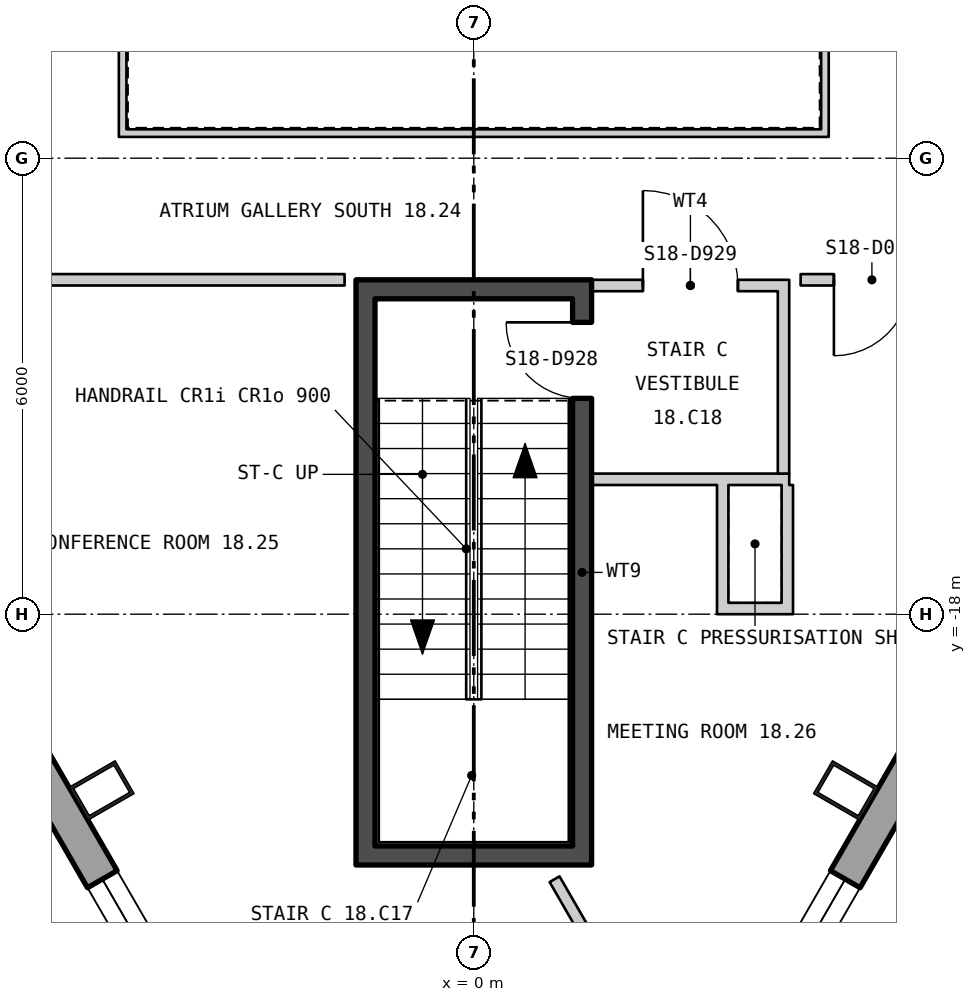
"""IFC4 building model, lengths in metres.
Left out: names, types, materials, properties, quantities, classifications, styles, units other than length and angle.
Written with IfcOpenShell. Run it as: python <this file> out.ifc"""

import sys

from ifc_helpers import new_model, si_unit, direction, frame, frame_2d, origin, origin_2d, place, context, subcontext, project, spatial, polyline, rectangle, hollow_rectangle, outline, extrude, element, fill, save


model = new_model("IFC4")
c1 = context("Model", 3, precision=1e-05, world=origin(), true_north=direction((0.0, 1.0)))
c2 = subcontext(c1, "Body", "Model", "MODEL_VIEW")
j1 = project(units=[si_unit("LENGTHUNIT", "METRE"), si_unit("PLANEANGLEUNIT", "RADIAN")], contexts=[c1])
p1 = place(None, origin())
s1 = spatial("IfcSite", under=j1, at=p1, CompositionType="ELEMENT")
p2 = place(p1, origin())
s2 = spatial("IfcBuilding", under=s1, at=p2, CompositionType="ELEMENT")
p3 = place(p2, frame((0.0, 0.0, 245.4)))
s3 = spatial("IfcBuildingStorey", under=s2, at=p3, CompositionType="ELEMENT", Elevation=245.4)
for number, where, z_axis, x_axis in (
    (1, (-4.897, -20.319, 0.0), (0.0, 0.0, 1.0), (0.5, -0.866, 0.0)),
    (2, (4.897, -20.319, 0.0), (0.0, 0.0, 1.0), (0.5, 0.866, 0.0)),
):
    element("IfcColumn", number, at=place(p3, frame(where, z_axis=z_axis, x_axis=x_axis)), inside=s3, PredefinedType="COLUMN", context=c2, shape_type="SweptSolid", body=[
        extrude(hollow_rectangle(XDim=0.5, YDim=0.7, WallThickness=0.045, at=origin_2d()), origin(), (0.0, 0.0, 1.0), 3.9),
    ])
p4 = place(p3, frame((-25.85, 14.822, -0.18), z_axis=(0.0, 0.0, 1.0), x_axis=(0.500000335318, -0.866025210188, 0.0)))
e3 = element("IfcWall", 3, at=p4, inside=s3, PredefinedType="SOLIDWALL", context=c2, shape_type="SweptSolid", body=[
    extrude(outline(polyline([(-0.13, -0.225), (45.88, -0.225), (45.62, 0.225), (0.13, 0.225), (-0.13, -0.225)])), origin(), (0.0, 0.0, 1.0), 3.68),
])
p5 = place(p4, frame((1.425, 0.0, 1.08)))
e4 = element("IfcOpeningElement", 4, at=p5, cuts=e3, PredefinedType="OPENING", context=c2, shape_type="SweptSolid", body=[
    extrude(rectangle(XDim=2.4, YDim=2.0, at=frame_2d((1.2, 1.0))), frame((0.0, 0.235, 0.0), z_axis=(0.0, -1.0, 0.0), x_axis=(1.0, 0.0, 0.0)), (0.0, 0.0, 1.0), 0.47),
])
p6 = place(p4, frame((10.403, 0.0, 1.08)))
e5 = element("IfcOpeningElement", 5, at=p6, cuts=e3, PredefinedType="OPENING", context=c2, shape_type="SweptSolid", body=[
    extrude(rectangle(XDim=2.4, YDim=2.0, at=frame_2d((1.2, 1.0))), frame((0.0, 0.235, 0.0), z_axis=(0.0, -1.0, 0.0), x_axis=(1.0, 0.0, 0.0)), (0.0, 0.0, 1.0), 0.47),
])
p7 = place(p4, frame((14.912, 0.0, 1.08)))
e6 = element("IfcOpeningElement", 6, at=p7, cuts=e3, PredefinedType="OPENING", context=c2, shape_type="SweptSolid", body=[
    extrude(rectangle(XDim=2.4, YDim=2.0, at=frame_2d((1.2, 1.0))), frame((0.0, 0.235, 0.0), z_axis=(0.0, -1.0, 0.0), x_axis=(1.0, 0.0, 0.0)), (0.0, 0.0, 1.0), 0.47),
])
p8 = place(p4, frame((19.421, 0.0, 1.08)))
e7 = element("IfcOpeningElement", 7, at=p8, cuts=e3, PredefinedType="OPENING", context=c2, shape_type="SweptSolid", body=[
    extrude(rectangle(XDim=2.4, YDim=2.0, at=frame_2d((1.2, 1.0))), frame((0.0, 0.235, 0.0), z_axis=(0.0, -1.0, 0.0), x_axis=(1.0, 0.0, 0.0)), (0.0, 0.0, 1.0), 0.47),
])
p9 = place(p4, frame((23.929, 0.0, 1.08)))
e8 = element("IfcOpeningElement", 8, at=p9, cuts=e3, PredefinedType="OPENING", context=c2, shape_type="SweptSolid", body=[
    extrude(rectangle(XDim=2.4, YDim=2.0, at=frame_2d((1.2, 1.0))), frame((0.0, 0.235, 0.0), z_axis=(0.0, -1.0, 0.0), x_axis=(1.0, 0.0, 0.0)), (0.0, 0.0, 1.0), 0.47),
])
p10 = place(p4, frame((28.438, 0.0, 1.08)))
e9 = element("IfcOpeningElement", 9, at=p10, cuts=e3, PredefinedType="OPENING", context=c2, shape_type="SweptSolid", body=[
    extrude(rectangle(XDim=2.4, YDim=2.0, at=frame_2d((1.2, 1.0))), frame((0.0, 0.235, 0.0), z_axis=(0.0, -1.0, 0.0), x_axis=(1.0, 0.0, 0.0)), (0.0, 0.0, 1.0), 0.47),
])
p11 = place(p4, frame((32.947, 0.0, 1.08)))
e10 = element("IfcOpeningElement", 10, at=p11, cuts=e3, PredefinedType="OPENING", context=c2, shape_type="SweptSolid", body=[
    extrude(rectangle(XDim=2.4, YDim=2.0, at=frame_2d((1.2, 1.0))), frame((0.0, 0.235, 0.0), z_axis=(0.0, -1.0, 0.0), x_axis=(1.0, 0.0, 0.0)), (0.0, 0.0, 1.0), 0.47),
])
p12 = place(p4, frame((37.455, 0.0, 1.08)))
e11 = element("IfcOpeningElement", 11, at=p12, cuts=e3, PredefinedType="OPENING", context=c2, shape_type="SweptSolid", body=[
    extrude(rectangle(XDim=2.4, YDim=2.0, at=frame_2d((1.2, 1.0))), frame((0.0, 0.235, 0.0), z_axis=(0.0, -1.0, 0.0), x_axis=(1.0, 0.0, 0.0)), (0.0, 0.0, 1.0), 0.47),
])
p13 = place(p4, frame((41.925, 0.0, 1.08)))
e12 = element("IfcOpeningElement", 12, at=p13, cuts=e3, PredefinedType="OPENING", context=c2, shape_type="SweptSolid", body=[
    extrude(rectangle(XDim=2.4, YDim=2.0, at=frame_2d((1.2, 1.0))), frame((0.0, 0.235, 0.0), z_axis=(0.0, -1.0, 0.0), x_axis=(1.0, 0.0, 0.0)), (0.0, 0.0, 1.0), 0.47),
])
p14 = place(p3, frame((2.975, -24.799, -0.18), z_axis=(0.0, 0.0, 1.0), x_axis=(0.500000335318, 0.866025210188, 0.0)))
e13 = element("IfcWall", 13, at=p14, inside=s3, PredefinedType="SOLIDWALL", context=c2, shape_type="SweptSolid", body=[
    extrude(outline(polyline([(-0.13, -0.225), (45.88, -0.225), (45.62, 0.225), (0.13, 0.225), (-0.13, -0.225)])), origin(), (0.0, 0.0, 1.0), 3.68),
])
p15 = place(p14, frame((1.425, 0.0, 1.08)))
e14 = element("IfcOpeningElement", 14, at=p15, cuts=e13, PredefinedType="OPENING", context=c2, shape_type="SweptSolid", body=[
    extrude(rectangle(XDim=2.4, YDim=2.0, at=frame_2d((1.2, 1.0))), frame((0.0, 0.235, 0.0), z_axis=(0.0, -1.0, 0.0), x_axis=(1.0, 0.0, 0.0)), (0.0, 0.0, 1.0), 0.47),
])
p16 = place(p14, frame((5.895, 0.0, 1.08)))
e15 = element("IfcOpeningElement", 15, at=p16, cuts=e13, PredefinedType="OPENING", context=c2, shape_type="SweptSolid", body=[
    extrude(rectangle(XDim=2.4, YDim=2.0, at=frame_2d((1.2, 1.0))), frame((0.0, 0.235, 0.0), z_axis=(0.0, -1.0, 0.0), x_axis=(1.0, 0.0, 0.0)), (0.0, 0.0, 1.0), 0.47),
])
p17 = place(p14, frame((10.403, 0.0, 1.08)))
e16 = element("IfcOpeningElement", 16, at=p17, cuts=e13, PredefinedType="OPENING", context=c2, shape_type="SweptSolid", body=[
    extrude(rectangle(XDim=2.4, YDim=2.0, at=frame_2d((1.2, 1.0))), frame((0.0, 0.235, 0.0), z_axis=(0.0, -1.0, 0.0), x_axis=(1.0, 0.0, 0.0)), (0.0, 0.0, 1.0), 0.47),
])
p18 = place(p14, frame((14.912, 0.0, 1.08)))
e17 = element("IfcOpeningElement", 17, at=p18, cuts=e13, PredefinedType="OPENING", context=c2, shape_type="SweptSolid", body=[
    extrude(rectangle(XDim=2.4, YDim=2.0, at=frame_2d((1.2, 1.0))), frame((0.0, 0.235, 0.0), z_axis=(0.0, -1.0, 0.0), x_axis=(1.0, 0.0, 0.0)), (0.0, 0.0, 1.0), 0.47),
])
p19 = place(p14, frame((19.421, 0.0, 1.08)))
e18 = element("IfcOpeningElement", 18, at=p19, cuts=e13, PredefinedType="OPENING", context=c2, shape_type="SweptSolid", body=[
    extrude(rectangle(XDim=2.4, YDim=2.0, at=frame_2d((1.2, 1.0))), frame((0.0, 0.235, 0.0), z_axis=(0.0, -1.0, 0.0), x_axis=(1.0, 0.0, 0.0)), (0.0, 0.0, 1.0), 0.47),
])
p20 = place(p14, frame((23.929, 0.0, 1.08)))
e19 = element("IfcOpeningElement", 19, at=p20, cuts=e13, PredefinedType="OPENING", context=c2, shape_type="SweptSolid", body=[
    extrude(rectangle(XDim=2.4, YDim=2.0, at=frame_2d((1.2, 1.0))), frame((0.0, 0.235, 0.0), z_axis=(0.0, -1.0, 0.0), x_axis=(1.0, 0.0, 0.0)), (0.0, 0.0, 1.0), 0.47),
])
p21 = place(p14, frame((28.438, 0.0, 1.08)))
e20 = element("IfcOpeningElement", 20, at=p21, cuts=e13, PredefinedType="OPENING", context=c2, shape_type="SweptSolid", body=[
    extrude(rectangle(XDim=2.4, YDim=2.0, at=frame_2d((1.2, 1.0))), frame((0.0, 0.235, 0.0), z_axis=(0.0, -1.0, 0.0), x_axis=(1.0, 0.0, 0.0)), (0.0, 0.0, 1.0), 0.47),
])
p22 = place(p14, frame((32.947, 0.0, 1.08)))
e21 = element("IfcOpeningElement", 21, at=p22, cuts=e13, PredefinedType="OPENING", context=c2, shape_type="SweptSolid", body=[
    extrude(rectangle(XDim=2.4, YDim=2.0, at=frame_2d((1.2, 1.0))), frame((0.0, 0.235, 0.0), z_axis=(0.0, -1.0, 0.0), x_axis=(1.0, 0.0, 0.0)), (0.0, 0.0, 1.0), 0.47),
])
p23 = place(p14, frame((37.455, 0.0, 1.08)))
e22 = element("IfcOpeningElement", 22, at=p23, cuts=e13, PredefinedType="OPENING", context=c2, shape_type="SweptSolid", body=[
    extrude(rectangle(XDim=2.4, YDim=2.0, at=frame_2d((1.2, 1.0))), frame((0.0, 0.235, 0.0), z_axis=(0.0, -1.0, 0.0), x_axis=(1.0, 0.0, 0.0)), (0.0, 0.0, 1.0), 0.47),
])
p24 = place(p14, frame((41.925, 0.0, 1.08)))
e23 = element("IfcOpeningElement", 23, at=p24, cuts=e13, PredefinedType="OPENING", context=c2, shape_type="SweptSolid", body=[
    extrude(rectangle(XDim=2.4, YDim=2.0, at=frame_2d((1.2, 1.0))), frame((0.0, 0.235, 0.0), z_axis=(0.0, -1.0, 0.0), x_axis=(1.0, 0.0, 0.0)), (0.0, 0.0, 1.0), 0.47),
])
p25 = place(p3, frame((-4.67, -11.67, 0.0), z_axis=(0.0, 0.0, 1.0), x_axis=(1.0, 0.0, 0.0)))
e24 = element("IfcWall", 24, at=p25, inside=s3, PredefinedType="PARTITIONING", context=c2, shape_type="SweptSolid", body=[
    extrude(rectangle(XDim=9.34, YDim=0.1, at=frame_2d((4.67, 0.0))), origin(), (0.0, 0.0, 1.0), 3.7),
])
for number, where, z_axis, x_axis in (
    (25, (4.62, -11.62, 0.0), (0.0, 0.0, 1.0), (0.0, 1.0, 0.0)),
    (26, (-4.62, -3.58, 0.0), (0.0, 0.0, 1.0), (0.0, -1.0, 0.0)),
):
    element("IfcWall", number, at=place(p3, frame(where, z_axis=z_axis, x_axis=x_axis)), inside=s3, PredefinedType="PARTITIONING", context=c2, shape_type="SweptSolid", body=[
        extrude(rectangle(XDim=8.04, YDim=0.1, at=frame_2d((4.02, 0.0))), origin(), (0.0, 0.0, 1.0), 3.7),
    ])
p26 = place(p3, frame((-1.425, -21.05, 0.0), z_axis=(0.0, 0.0, 1.0), x_axis=(0.0, 1.0, 0.0)))
e27 = element("IfcWall", 27, at=p26, inside=s3, PredefinedType="SHEAR", context=c2, shape_type="SweptSolid", body=[
    extrude(rectangle(XDim=7.2, YDim=0.25, at=frame_2d((3.6, 0.0))), origin(), (0.0, 0.0, 1.0), 3.7),
])
p27 = place(p3, frame((1.425, -21.05, 0.0), z_axis=(0.0, 0.0, 1.0), x_axis=(0.0, 1.0, 0.0)))
e28 = element("IfcWall", 28, at=p27, inside=s3, PredefinedType="SHEAR", context=c2, shape_type="SweptSolid", body=[
    extrude(rectangle(XDim=7.2, YDim=0.25, at=frame_2d((3.6, 0.0))), origin(), (0.0, 0.0, 1.0), 3.7),
])
p28 = place(p27, frame((5.89, 0.0, 0.0)))
e29 = element("IfcOpeningElement", 29, at=p28, cuts=e28, PredefinedType="OPENING", context=c2, shape_type="SweptSolid", body=[
    extrude(rectangle(XDim=1.0, YDim=2.1, at=frame_2d((0.5, 1.05))), frame((0.0, 0.135, 0.0), z_axis=(0.0, -1.0, 0.0), x_axis=(1.0, 0.0, 0.0)), (0.0, 0.0, 1.0), 0.27),
])
for number, where, z_axis, x_axis in (
    (30, (-1.55, -21.175, 0.0), (0.0, 0.0, 1.0), (1.0, 0.0, 0.0)),
    (31, (-1.55, -13.725, 0.0), (0.0, 0.0, 1.0), (1.0, 0.0, 0.0)),
):
    element("IfcWall", number, at=place(p3, frame(where, z_axis=z_axis, x_axis=x_axis)), inside=s3, PredefinedType="SHEAR", context=c2, shape_type="SweptSolid", body=[
        extrude(rectangle(XDim=3.1, YDim=0.25, at=frame_2d((1.55, 0.0))), origin(), (0.0, 0.0, 1.0), 3.7),
    ])
p29 = place(p3, frame((1.55, -16.225, 0.0), z_axis=(0.0, 0.0, 1.0), x_axis=(1.0, 0.0, 0.0)))
e32 = element("IfcWall", 32, at=p29, inside=s3, PredefinedType="PARTITIONING", context=c2, shape_type="SweptSolid", body=[
    extrude(rectangle(XDim=2.6, YDim=0.15, at=frame_2d((1.3, 0.0))), origin(), (0.0, 0.0, 1.0), 3.7),
])
p30 = place(p3, frame((4.075, -16.15, 0.0), z_axis=(0.0, 0.0, 1.0), x_axis=(0.0, 1.0, 0.0)))
e33 = element("IfcWall", 33, at=p30, inside=s3, PredefinedType="PARTITIONING", context=c2, shape_type="SweptSolid", body=[
    extrude(rectangle(XDim=2.4, YDim=0.15, at=frame_2d((1.2, 0.0))), origin(), (0.0, 0.0, 1.0), 3.7),
])
p31 = place(p3, frame((1.55, -13.675, 0.0), z_axis=(0.0, 0.0, 1.0), x_axis=(1.0, 0.0, 0.0)))
e34 = element("IfcWall", 34, at=p31, inside=s3, PredefinedType="PARTITIONING", context=c2, shape_type="SweptSolid", body=[
    extrude(rectangle(XDim=2.6, YDim=0.15, at=frame_2d((1.3, 0.0))), origin(), (0.0, 0.0, 1.0), 2.91),
])
p32 = place(p31, frame((0.675, 0.0, 0.0)))
e35 = element("IfcOpeningElement", 35, at=p32, cuts=e34, PredefinedType="OPENING", context=c2, shape_type="SweptSolid", body=[
    extrude(rectangle(XDim=1.25, YDim=2.1, at=frame_2d((0.625, 1.05))), frame((0.0, 0.085, 0.0), z_axis=(0.0, -1.0, 0.0), x_axis=(1.0, 0.0, 0.0)), (0.0, 0.0, 1.0), 0.17),
])
p33 = place(p3, frame((3.275, -18.0, 0.0), z_axis=(0.0, 0.0, 1.0), x_axis=(0.0, 1.0, 0.0)))
e36 = element("IfcWall", 36, at=p33, inside=s3, PredefinedType="PARTITIONING", context=c2, shape_type="SweptSolid", body=[
    extrude(rectangle(XDim=1.7, YDim=0.15, at=frame_2d((0.85, 0.0))), origin(), (0.0, 0.0, 1.0), 3.01),
])
p34 = place(p3, frame((3.35, -17.925, 0.0), z_axis=(0.0, 0.0, 1.0), x_axis=(1.0, 0.0, 0.0)))
e37 = element("IfcWall", 37, at=p34, inside=s3, PredefinedType="PARTITIONING", context=c2, shape_type="SweptSolid", body=[
    extrude(rectangle(XDim=0.7, YDim=0.15, at=frame_2d((0.35, 0.0))), origin(), (0.0, 0.0, 1.0), 3.7),
])
p35 = place(p3, frame((4.125, -18.0, 0.0), z_axis=(0.0, 0.0, 1.0), x_axis=(0.0, 1.0, 0.0)))
e38 = element("IfcWall", 38, at=p35, inside=s3, PredefinedType="PARTITIONING", context=c2, shape_type="SweptSolid", body=[
    extrude(rectangle(XDim=1.7, YDim=0.15, at=frame_2d((0.85, 0.0))), origin(), (0.0, 0.0, 1.0), 3.7),
])
p36 = place(p3, frame((-6.7, -13.6, 0.0), z_axis=(0.0, 0.0, 1.0), x_axis=(1.0, 0.0, 0.0)))
e39 = element("IfcWall", 39, at=p36, inside=s3, PredefinedType="PARTITIONING", context=c2, shape_type="SweptSolid", body=[
    extrude(rectangle(XDim=5.0, YDim=0.15, at=frame_2d((2.5, 0.0))), origin(), (0.0, 0.0, 1.0), 2.91),
])
p37 = place(p3, frame((1.063, -21.487, 0.0), z_axis=(0.0, 0.0, 1.0), x_axis=(0.499543741449, -0.866288664579, 0.0)))
e40 = element("IfcWall", 40, at=p37, inside=s3, PredefinedType="PARTITIONING", context=c2, shape_type="SweptSolid", body=[
    extrude(rectangle(XDim=2.907, YDim=0.15, at=frame_2d((1.453, 0.0))), origin(), (0.0, 0.0, 1.0), 3.7),
])
p38 = place(p3, frame((4.3, -13.6, 0.0), z_axis=(0.0, 0.0, 1.0), x_axis=(1.0, 0.0, 0.0)))
e41 = element("IfcWall", 41, at=p38, inside=s3, PredefinedType="PARTITIONING", context=c2, shape_type="SweptSolid", body=[
    extrude(rectangle(XDim=2.4, YDim=0.15, at=frame_2d((1.2, 0.0))), origin(), (0.0, 0.0, 1.0), 2.91),
])
p39 = place(p38, frame((0.438, 0.0, 0.0)))
e42 = element("IfcOpeningElement", 42, at=p39, cuts=e41, PredefinedType="OPENING", context=c2, shape_type="SweptSolid", body=[
    extrude(rectangle(XDim=1.0, YDim=2.1, at=frame_2d((0.5, 1.05))), frame((0.0, 0.085, 0.0), z_axis=(0.0, -1.0, 0.0), x_axis=(1.0, 0.0, 0.0)), (0.0, 0.0, 1.0), 0.17),
])
p40 = place(p13, origin())
e43 = element("IfcWindow", 43, at=p40, inside=s3, PartitioningType="SINGLE_PANEL", PredefinedType="WINDOW", context=c2, shape_type="SweptSolid", body=[
    extrude(rectangle(XDim=2.4, YDim=2.0, at=frame_2d((1.2, 1.0))), frame((0.0, 0.105, 0.0), z_axis=(0.0, -1.0, 0.0), x_axis=(1.0, 0.0, 0.0)), (0.0, 0.0, 1.0), 0.06),
])
fill(e12, e43)
p41 = place(p15, origin())
e44 = element("IfcWindow", 44, at=p41, inside=s3, PartitioningType="SINGLE_PANEL", PredefinedType="WINDOW", context=c2, shape_type="SweptSolid", body=[
    extrude(rectangle(XDim=2.4, YDim=2.0, at=frame_2d((1.2, 1.0))), frame((0.0, 0.105, 0.0), z_axis=(0.0, -1.0, 0.0), x_axis=(1.0, 0.0, 0.0)), (0.0, 0.0, 1.0), 0.06),
])
fill(e14, e44)
p42 = place(p28, origin())
e45 = element("IfcDoor", 45, at=p42, inside=s3, OperationType="SINGLE_SWING_LEFT", PredefinedType="DOOR", context=c2, shape_type="SweptSolid", body=[
    extrude(rectangle(XDim=1.0, YDim=2.1, at=frame_2d((0.5, 1.05))), frame((0.0, 0.025, 0.0), z_axis=(0.0, -1.0, 0.0), x_axis=(1.0, 0.0, 0.0)), (0.0, 0.0, 1.0), 0.05),
])
fill(e29, e45)
p43 = place(p32, origin())
e46 = element("IfcDoor", 46, at=p43, inside=s3, OperationType="SINGLE_SWING_RIGHT", PredefinedType="DOOR", context=c2, shape_type="SweptSolid", body=[
    extrude(rectangle(XDim=1.25, YDim=2.1, at=frame_2d((0.625, 1.05))), frame((0.0, 0.025, 0.0), z_axis=(0.0, -1.0, 0.0), x_axis=(1.0, 0.0, 0.0)), (0.0, 0.0, 1.0), 0.05),
])
fill(e35, e46)
p44 = place(p39, origin())
e47 = element("IfcDoor", 47, at=p44, inside=s3, OperationType="SINGLE_SWING_LEFT", PredefinedType="DOOR", context=c2, shape_type="SweptSolid", body=[
    extrude(rectangle(XDim=1.0, YDim=2.1, at=frame_2d((0.5, 1.05))), frame((0.0, 0.025, 0.0), z_axis=(0.0, -1.0, 0.0), x_axis=(1.0, 0.0, 0.0)), (0.0, 0.0, 1.0), 0.05),
])
fill(e42, e47)
save(model, sys.argv[1])
